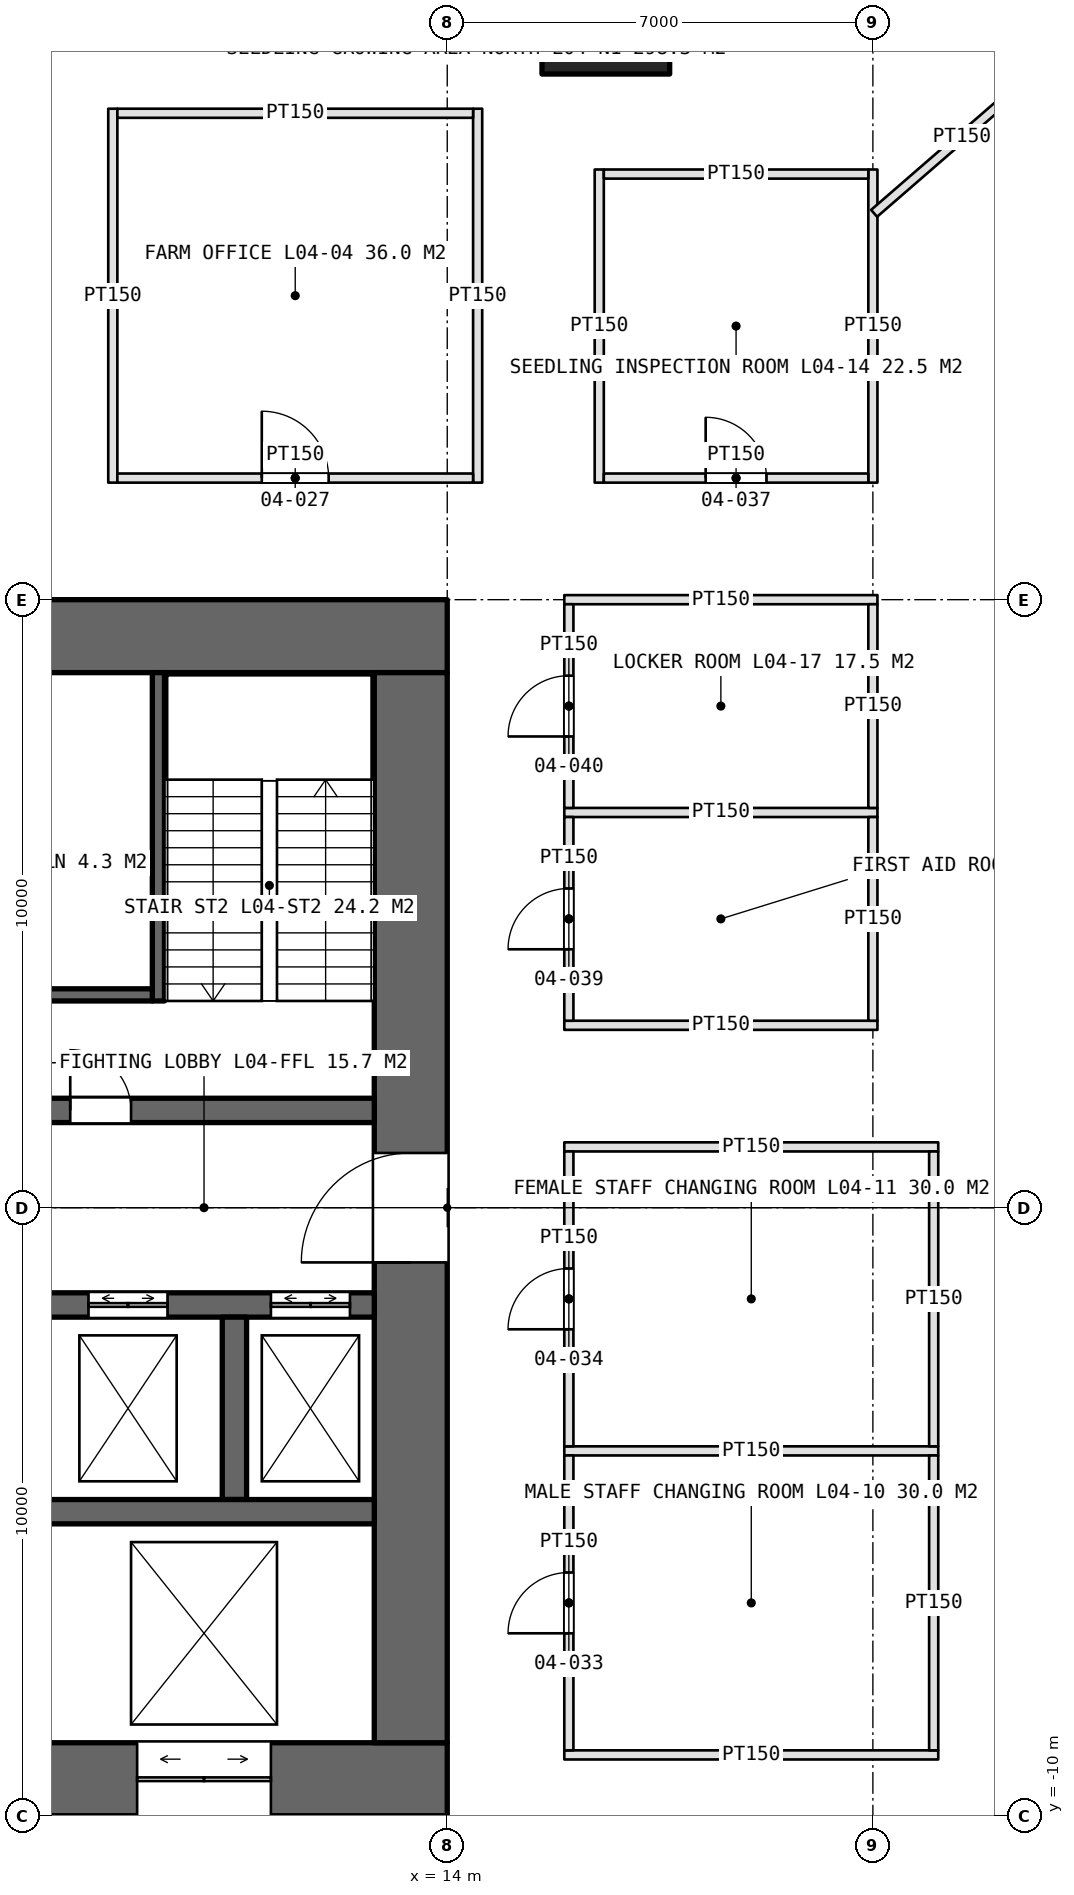
"""IFC4 building model, lengths in metres.
Left out: names, types, materials, properties, quantities, classifications, styles, units other than length and angle.
Written with IfcOpenShell. Run it as: python <this file> out.ifc"""

import sys

from ifc_helpers import new_model, si_unit, direction, frame, frame_2d, origin, origin_2d, place, context, subcontext, project, spatial, rectangle, extrude, element, fill, save


model = new_model("IFC4")
c1 = context("Model", 3, precision=1e-05, world=origin(), true_north=direction((0.0, 1.0)))
c2 = subcontext(c1, "Body", "Model", "MODEL_VIEW")
j1 = project(units=[si_unit("LENGTHUNIT", "METRE"), si_unit("PLANEANGLEUNIT", "RADIAN")], contexts=[c1])
p1 = place(None, origin())
s1 = spatial("IfcSite", under=j1, at=p1, CompositionType="ELEMENT")
p2 = place(p1, origin())
s2 = spatial("IfcBuilding", under=s1, at=p2, CompositionType="ELEMENT")
p3 = place(p2, frame((0.0, 0.0, 20.0)))
s3 = spatial("IfcBuildingStorey", under=s2, at=p3, CompositionType="ELEMENT", Elevation=20.0)
p4 = place(p3, frame((-14.0, -9.4, 0.0), z_axis=(0.0, 0.0, 1.0), x_axis=(1.0, 0.0, 0.0)))
e1 = element("IfcWall", 1, at=p4, inside=s3, PredefinedType="SHEAR", context=c2, shape_type="SweptSolid", body=[
    extrude(rectangle(XDim=28.0, YDim=1.2, at=frame_2d((14.0, 0.0))), origin(), (0.0, 0.0, 1.0), 5.0),
])
p5 = place(p4, frame((13.1, 0.0, 0.0)))
e2 = element("IfcOpeningElement", 2, at=p5, cuts=e1, PredefinedType="OPENING", context=c2, shape_type="SweptSolid", body=[
    extrude(rectangle(XDim=1.8, YDim=2.4, at=frame_2d((0.9, 1.2))), frame((0.0, 0.61, 0.0), z_axis=(0.0, -1.0, 0.0), x_axis=(1.0, 0.0, 0.0)), (0.0, 0.0, 1.0), 1.22),
])
p6 = place(p4, frame((22.9, 0.0, 0.0)))
e3 = element("IfcOpeningElement", 3, at=p6, cuts=e1, PredefinedType="OPENING", context=c2, shape_type="SweptSolid", body=[
    extrude(rectangle(XDim=2.2, YDim=2.7, at=frame_2d((1.1, 1.35))), frame((0.0, 0.61, 0.0), z_axis=(0.0, -1.0, 0.0), x_axis=(1.0, 0.0, 0.0)), (0.0, 0.0, 1.0), 1.22),
])
p7 = place(p3, frame((14.0, 9.4, 0.0), z_axis=(0.0, 0.0, 1.0), x_axis=(-1.0, 0.0, 0.0)))
e4 = element("IfcWall", 4, at=p7, inside=s3, PredefinedType="SHEAR", context=c2, shape_type="SweptSolid", body=[
    extrude(rectangle(XDim=28.0, YDim=1.2, at=frame_2d((14.0, 0.0))), origin(), (0.0, 0.0, 1.0), 5.0),
])
p8 = place(p7, frame((24.0, 0.0, 0.0)))
e5 = element("IfcOpeningElement", 5, at=p8, cuts=e4, PredefinedType="OPENING", context=c2, shape_type="SweptSolid", body=[
    extrude(rectangle(XDim=1.0, YDim=2.4, at=frame_2d((0.5, 1.2))), frame((0.0, 0.61, 0.0), z_axis=(0.0, -1.0, 0.0), x_axis=(1.0, 0.0, 0.0)), (0.0, 0.0, 1.0), 1.22),
])
p9 = place(p7, frame((13.1, 0.0, 0.0)))
e6 = element("IfcOpeningElement", 6, at=p9, cuts=e4, PredefinedType="OPENING", context=c2, shape_type="SweptSolid", body=[
    extrude(rectangle(XDim=1.8, YDim=2.4, at=frame_2d((0.9, 1.2))), frame((0.0, 0.61, 0.0), z_axis=(0.0, -1.0, 0.0), x_axis=(1.0, 0.0, 0.0)), (0.0, 0.0, 1.0), 1.22),
])
p10 = place(p3, frame((13.4, -8.8, 0.0), z_axis=(0.0, 0.0, 1.0), x_axis=(0.0, 1.0, 0.0)))
e7 = element("IfcWall", 7, at=p10, inside=s3, PredefinedType="SHEAR", context=c2, shape_type="SweptSolid", body=[
    extrude(rectangle(XDim=17.6, YDim=1.2, at=frame_2d((8.8, 0.0))), origin(), (0.0, 0.0, 1.0), 5.0),
])
p11 = place(p10, frame((7.9, 0.0, 0.0)))
e8 = element("IfcOpeningElement", 8, at=p11, cuts=e7, PredefinedType="OPENING", context=c2, shape_type="SweptSolid", body=[
    extrude(rectangle(XDim=1.8, YDim=2.4, at=frame_2d((0.9, 1.2))), frame((0.0, 0.61, 0.0), z_axis=(0.0, -1.0, 0.0), x_axis=(1.0, 0.0, 0.0)), (0.0, 0.0, 1.0), 1.22),
])
p12 = place(p3, frame((7.2, 1.6, 0.0), z_axis=(0.0, 0.0, 1.0), x_axis=(1.0, 0.0, 0.0)))
e9 = element("IfcWall", 9, at=p12, inside=s3, PredefinedType="SHEAR", context=c2, shape_type="SweptSolid", body=[
    extrude(rectangle(XDim=5.6, YDim=0.4, at=frame_2d((2.8, 0.0))), origin(), (0.0, 0.0, 1.0), 5.0),
])
p13 = place(p12, frame((0.6, 0.0, 0.0)))
e10 = element("IfcOpeningElement", 10, at=p13, cuts=e9, PredefinedType="OPENING", context=c2, shape_type="SweptSolid", body=[
    extrude(rectangle(XDim=1.0, YDim=2.4, at=frame_2d((0.5, 1.2))), frame((0.0, 0.21, 0.0), z_axis=(0.0, -1.0, 0.0), x_axis=(1.0, 0.0, 0.0)), (0.0, 0.0, 1.0), 0.42),
])
p14 = place(p3, frame((7.2, -1.6, 0.0), z_axis=(0.0, 0.0, 1.0), x_axis=(1.0, 0.0, 0.0)))
e11 = element("IfcWall", 11, at=p14, inside=s3, PredefinedType="SHEAR", context=c2, shape_type="SweptSolid", body=[
    extrude(rectangle(XDim=5.6, YDim=0.4, at=frame_2d((2.8, 0.0))), origin(), (0.0, 0.0, 1.0), 5.0),
])
p15 = place(p14, frame((0.9, 0.0, 0.0)))
e12 = element("IfcOpeningElement", 12, at=p15, cuts=e11, PredefinedType="OPENING", context=c2, shape_type="SweptSolid", body=[
    extrude(rectangle(XDim=1.3, YDim=2.4, at=frame_2d((0.65, 1.2))), frame((0.0, 0.21, 0.0), z_axis=(0.0, -1.0, 0.0), x_axis=(1.0, 0.0, 0.0)), (0.0, 0.0, 1.0), 0.42),
])
p16 = place(p14, frame((3.9, 0.0, 0.0)))
e13 = element("IfcOpeningElement", 13, at=p16, cuts=e11, PredefinedType="OPENING", context=c2, shape_type="SweptSolid", body=[
    extrude(rectangle(XDim=1.3, YDim=2.4, at=frame_2d((0.65, 1.2))), frame((0.0, 0.21, 0.0), z_axis=(0.0, -1.0, 0.0), x_axis=(1.0, 0.0, 0.0)), (0.0, 0.0, 1.0), 0.42),
])
p17 = place(p3, frame((10.5, -4.8, 0.0), z_axis=(0.0, 0.0, 1.0), x_axis=(0.0, 1.0, 0.0)))
e14 = element("IfcWall", 14, at=p17, inside=s3, PredefinedType="SHEAR", context=c2, shape_type="SweptSolid", body=[
    extrude(rectangle(XDim=3.0, YDim=0.4, at=frame_2d((1.5, 0.0))), origin(), (0.0, 0.0, 1.0), 5.0),
])
p18 = place(p3, frame((7.2, -5.0, 0.0), z_axis=(0.0, 0.0, 1.0), x_axis=(1.0, 0.0, 0.0)))
e15 = element("IfcWall", 15, at=p18, inside=s3, PredefinedType="SHEAR", context=c2, shape_type="SweptSolid", body=[
    extrude(rectangle(XDim=5.6, YDim=0.4, at=frame_2d((2.8, 0.0))), origin(), (0.0, 0.0, 1.0), 5.0),
])
p19 = place(p3, frame((16.608, 19.695, 0.0), z_axis=(0.0, 0.0, 1.0), x_axis=(1.0, 0.0, 0.0)))
e16 = element("IfcColumn", 16, at=p19, inside=s3, PredefinedType="COLUMN", context=c2, shape_type="SweptSolid", body=[
    extrude(rectangle(XDim=2.1, YDim=2.1, at=origin_2d()), origin(), (0.0, 0.0, 1.0), 5.0),
])
p20 = place(p3, frame((9.25, 3.4, 0.0), z_axis=(0.0, 0.0, 1.0), x_axis=(0.0, 1.0, 0.0)))
e17 = element("IfcWall", 17, at=p20, inside=s3, PredefinedType="SOLIDWALL", context=c2, shape_type="SweptSolid", body=[
    extrude(rectangle(XDim=5.4, YDim=0.2, at=frame_2d((2.7, 0.0))), origin(), (0.0, 0.0, 1.0), 5.0),
])
p21 = place(p3, frame((9.15, 3.5, 0.0), z_axis=(0.0, 0.0, 1.0), x_axis=(-1.0, 0.0, 0.0)))
e18 = element("IfcWall", 18, at=p21, inside=s3, PredefinedType="SOLIDWALL", context=c2, shape_type="SweptSolid", body=[
    extrude(rectangle(XDim=1.95, YDim=0.2, at=frame_2d((0.975, 0.0))), origin(), (0.0, 0.0, 1.0), 5.0),
])
for number, where, z_axis, x_axis in (
    (19, (8.5, 11.925, 0.0), (0.0, 0.0, 1.0), (0.0, 1.0, 0.0)),
    (20, (14.5, 11.925, 0.0), (0.0, 0.0, 1.0), (0.0, 1.0, 0.0)),
):
    element("IfcWall", number, at=place(p3, frame(where, z_axis=z_axis, x_axis=x_axis)), inside=s3, PredefinedType="PARTITIONING", context=c2, shape_type="SweptSolid", body=[
        extrude(rectangle(XDim=6.15, YDim=0.15, at=frame_2d((3.075, 0.0))), origin(), (0.0, 0.0, 1.0), 3.6),
    ])
p22 = place(p3, frame((8.575, 12.0, 0.0), z_axis=(0.0, 0.0, 1.0), x_axis=(1.0, 0.0, 0.0)))
e21 = element("IfcWall", 21, at=p22, inside=s3, PredefinedType="PARTITIONING", context=c2, shape_type="SweptSolid", body=[
    extrude(rectangle(XDim=5.85, YDim=0.15, at=frame_2d((2.925, 0.0))), origin(), (0.0, 0.0, 1.0), 3.6),
])
p23 = place(p22, frame((2.375, 0.0, 0.0)))
e22 = element("IfcOpeningElement", 22, at=p23, cuts=e21, PredefinedType="OPENING", context=c2, shape_type="SweptSolid", body=[
    extrude(rectangle(XDim=1.1, YDim=2.3, at=frame_2d((0.55, 1.15))), frame((0.0, 0.085, 0.0), z_axis=(0.0, -1.0, 0.0), x_axis=(1.0, 0.0, 0.0)), (0.0, 0.0, 1.0), 0.17),
])
p24 = place(p3, frame((8.575, 18.0, 0.0), z_axis=(0.0, 0.0, 1.0), x_axis=(1.0, 0.0, 0.0)))
e23 = element("IfcWall", 23, at=p24, inside=s3, PredefinedType="PARTITIONING", context=c2, shape_type="SweptSolid", body=[
    extrude(rectangle(XDim=5.85, YDim=0.15, at=frame_2d((2.925, 0.0))), origin(), (0.0, 0.0, 1.0), 3.6),
])
for number, where, z_axis, x_axis in (
    (24, (15.925, -9.0, 0.0), (0.0, 0.0, 1.0), (1.0, 0.0, 0.0)),
    (25, (15.925, -4.0, 0.0), (0.0, 0.0, 1.0), (1.0, 0.0, 0.0)),
    (26, (15.925, 1.0, 0.0), (0.0, 0.0, 1.0), (1.0, 0.0, 0.0)),
):
    element("IfcWall", number, at=place(p3, frame(where, z_axis=z_axis, x_axis=x_axis)), inside=s3, PredefinedType="PARTITIONING", context=c2, shape_type="SweptSolid", body=[
        extrude(rectangle(XDim=6.15, YDim=0.15, at=frame_2d((3.075, 0.0))), origin(), (0.0, 0.0, 1.0), 3.6),
    ])
p25 = place(p3, frame((16.0, -8.925, 0.0), z_axis=(0.0, 0.0, 1.0), x_axis=(0.0, 1.0, 0.0)))
e27 = element("IfcWall", 27, at=p25, inside=s3, PredefinedType="PARTITIONING", context=c2, shape_type="SweptSolid", body=[
    extrude(rectangle(XDim=4.85, YDim=0.15, at=frame_2d((2.425, 0.0))), origin(), (0.0, 0.0, 1.0), 3.6),
])
p26 = place(p25, frame((1.925, 0.0, 0.0)))
e28 = element("IfcOpeningElement", 28, at=p26, cuts=e27, PredefinedType="OPENING", context=c2, shape_type="SweptSolid", body=[
    extrude(rectangle(XDim=1.0, YDim=2.2, at=frame_2d((0.5, 1.1))), frame((0.0, 0.085, 0.0), z_axis=(0.0, -1.0, 0.0), x_axis=(1.0, 0.0, 0.0)), (0.0, 0.0, 1.0), 0.17),
])
p27 = place(p3, frame((22.0, -8.925, 0.0), z_axis=(0.0, 0.0, 1.0), x_axis=(0.0, 1.0, 0.0)))
e29 = element("IfcWall", 29, at=p27, inside=s3, PredefinedType="PARTITIONING", context=c2, shape_type="SweptSolid", body=[
    extrude(rectangle(XDim=4.85, YDim=0.15, at=frame_2d((2.425, 0.0))), origin(), (0.0, 0.0, 1.0), 3.6),
])
p28 = place(p3, frame((16.0, -3.925, 0.0), z_axis=(0.0, 0.0, 1.0), x_axis=(0.0, 1.0, 0.0)))
e30 = element("IfcWall", 30, at=p28, inside=s3, PredefinedType="PARTITIONING", context=c2, shape_type="SweptSolid", body=[
    extrude(rectangle(XDim=4.85, YDim=0.15, at=frame_2d((2.425, 0.0))), origin(), (0.0, 0.0, 1.0), 3.6),
])
p29 = place(p28, frame((1.925, 0.0, 0.0)))
e31 = element("IfcOpeningElement", 31, at=p29, cuts=e30, PredefinedType="OPENING", context=c2, shape_type="SweptSolid", body=[
    extrude(rectangle(XDim=1.0, YDim=2.2, at=frame_2d((0.5, 1.1))), frame((0.0, 0.085, 0.0), z_axis=(0.0, -1.0, 0.0), x_axis=(1.0, 0.0, 0.0)), (0.0, 0.0, 1.0), 0.17),
])
p30 = place(p3, frame((22.0, -3.925, 0.0), z_axis=(0.0, 0.0, 1.0), x_axis=(0.0, 1.0, 0.0)))
e32 = element("IfcWall", 32, at=p30, inside=s3, PredefinedType="PARTITIONING", context=c2, shape_type="SweptSolid", body=[
    extrude(rectangle(XDim=4.85, YDim=0.15, at=frame_2d((2.425, 0.0))), origin(), (0.0, 0.0, 1.0), 3.6),
])
for number, where, z_axis, x_axis in (
    (33, (16.5, 11.925, 0.0), (0.0, 0.0, 1.0), (0.0, 1.0, 0.0)),
    (34, (21.0, 11.925, 0.0), (0.0, 0.0, 1.0), (0.0, 1.0, 0.0)),
):
    element("IfcWall", number, at=place(p3, frame(where, z_axis=z_axis, x_axis=x_axis)), inside=s3, PredefinedType="PARTITIONING", context=c2, shape_type="SweptSolid", body=[
        extrude(rectangle(XDim=5.15, YDim=0.15, at=frame_2d((2.575, 0.0))), origin(), (0.0, 0.0, 1.0), 3.6),
    ])
p31 = place(p3, frame((16.575, 12.0, 0.0), z_axis=(0.0, 0.0, 1.0), x_axis=(1.0, 0.0, 0.0)))
e35 = element("IfcWall", 35, at=p31, inside=s3, PredefinedType="PARTITIONING", context=c2, shape_type="SweptSolid", body=[
    extrude(rectangle(XDim=4.35, YDim=0.15, at=frame_2d((2.175, 0.0))), origin(), (0.0, 0.0, 1.0), 3.6),
])
p32 = place(p31, frame((1.675, 0.0, 0.0)))
e36 = element("IfcOpeningElement", 36, at=p32, cuts=e35, PredefinedType="OPENING", context=c2, shape_type="SweptSolid", body=[
    extrude(rectangle(XDim=1.0, YDim=2.2, at=frame_2d((0.5, 1.1))), frame((0.0, 0.085, 0.0), z_axis=(0.0, -1.0, 0.0), x_axis=(1.0, 0.0, 0.0)), (0.0, 0.0, 1.0), 0.17),
])
p33 = place(p3, frame((16.575, 17.0, 0.0), z_axis=(0.0, 0.0, 1.0), x_axis=(1.0, 0.0, 0.0)))
e37 = element("IfcWall", 37, at=p33, inside=s3, PredefinedType="PARTITIONING", context=c2, shape_type="SweptSolid", body=[
    extrude(rectangle(XDim=4.35, YDim=0.15, at=frame_2d((2.175, 0.0))), origin(), (0.0, 0.0, 1.0), 3.6),
])
for number, where, z_axis, x_axis in (
    (38, (15.925, 3.0, 0.0), (0.0, 0.0, 1.0), (1.0, 0.0, 0.0)),
    (39, (15.925, 6.5, 0.0), (0.0, 0.0, 1.0), (1.0, 0.0, 0.0)),
    (40, (15.925, 10.0, 0.0), (0.0, 0.0, 1.0), (1.0, 0.0, 0.0)),
):
    element("IfcWall", number, at=place(p3, frame(where, z_axis=z_axis, x_axis=x_axis)), inside=s3, PredefinedType="PARTITIONING", context=c2, shape_type="SweptSolid", body=[
        extrude(rectangle(XDim=5.15, YDim=0.15, at=frame_2d((2.575, 0.0))), origin(), (0.0, 0.0, 1.0), 3.6),
    ])
p34 = place(p3, frame((16.0, 3.075, 0.0), z_axis=(0.0, 0.0, 1.0), x_axis=(0.0, 1.0, 0.0)))
e41 = element("IfcWall", 41, at=p34, inside=s3, PredefinedType="PARTITIONING", context=c2, shape_type="SweptSolid", body=[
    extrude(rectangle(XDim=3.35, YDim=0.15, at=frame_2d((1.675, 0.0))), origin(), (0.0, 0.0, 1.0), 3.6),
])
p35 = place(p34, frame((1.175, 0.0, 0.0)))
e42 = element("IfcOpeningElement", 42, at=p35, cuts=e41, PredefinedType="OPENING", context=c2, shape_type="SweptSolid", body=[
    extrude(rectangle(XDim=1.0, YDim=2.2, at=frame_2d((0.5, 1.1))), frame((0.0, 0.085, 0.0), z_axis=(0.0, -1.0, 0.0), x_axis=(1.0, 0.0, 0.0)), (0.0, 0.0, 1.0), 0.17),
])
p36 = place(p3, frame((21.0, 3.075, 0.0), z_axis=(0.0, 0.0, 1.0), x_axis=(0.0, 1.0, 0.0)))
e43 = element("IfcWall", 43, at=p36, inside=s3, PredefinedType="PARTITIONING", context=c2, shape_type="SweptSolid", body=[
    extrude(rectangle(XDim=3.35, YDim=0.15, at=frame_2d((1.675, 0.0))), origin(), (0.0, 0.0, 1.0), 3.6),
])
p37 = place(p3, frame((16.0, 6.575, 0.0), z_axis=(0.0, 0.0, 1.0), x_axis=(0.0, 1.0, 0.0)))
e44 = element("IfcWall", 44, at=p37, inside=s3, PredefinedType="PARTITIONING", context=c2, shape_type="SweptSolid", body=[
    extrude(rectangle(XDim=3.35, YDim=0.15, at=frame_2d((1.675, 0.0))), origin(), (0.0, 0.0, 1.0), 3.6),
])
p38 = place(p37, frame((1.175, 0.0, 0.0)))
e45 = element("IfcOpeningElement", 45, at=p38, cuts=e44, PredefinedType="OPENING", context=c2, shape_type="SweptSolid", body=[
    extrude(rectangle(XDim=1.0, YDim=2.2, at=frame_2d((0.5, 1.1))), frame((0.0, 0.085, 0.0), z_axis=(0.0, -1.0, 0.0), x_axis=(1.0, 0.0, 0.0)), (0.0, 0.0, 1.0), 0.17),
])
p39 = place(p3, frame((21.0, 6.575, 0.0), z_axis=(0.0, 0.0, 1.0), x_axis=(0.0, 1.0, 0.0)))
e46 = element("IfcWall", 46, at=p39, inside=s3, PredefinedType="PARTITIONING", context=c2, shape_type="SweptSolid", body=[
    extrude(rectangle(XDim=3.35, YDim=0.15, at=frame_2d((1.675, 0.0))), origin(), (0.0, 0.0, 1.0), 3.6),
])
p40 = place(p3, frame((21.02, 16.354, 0.0), z_axis=(0.0, 0.0, 1.0), x_axis=(0.755425653008, 0.655234372402, 0.0)))
e47 = element("IfcWall", 47, at=p40, inside=s3, PredefinedType="PARTITIONING", context=c2, shape_type="SweptSolid", body=[
    extrude(rectangle(XDim=3.823, YDim=0.15, at=frame_2d((1.912, 0.0))), origin(), (0.0, 0.0, 1.0), 3.6),
])
p41 = place(p11, origin())
e48 = element("IfcDoor", 48, at=p41, inside=s3, OperationType="DOUBLE_DOOR_SINGLE_SWING", PredefinedType="DOOR", context=c2, shape_type="SweptSolid", body=[
    extrude(rectangle(XDim=1.8, YDim=2.4, at=frame_2d((0.9, 1.2))), frame((0.0, 0.025, 0.0), z_axis=(0.0, -1.0, 0.0), x_axis=(1.0, 0.0, 0.0)), (0.0, 0.0, 1.0), 0.05),
])
fill(e8, e48)
p42 = place(p13, origin())
e49 = element("IfcDoor", 49, at=p42, inside=s3, OperationType="SINGLE_SWING_LEFT", PredefinedType="DOOR", context=c2, shape_type="SweptSolid", body=[
    extrude(rectangle(XDim=1.0, YDim=2.4, at=frame_2d((0.5, 1.2))), frame((0.0, 0.025, 0.0), z_axis=(0.0, -1.0, 0.0), x_axis=(1.0, 0.0, 0.0)), (0.0, 0.0, 1.0), 0.05),
])
fill(e10, e49)
p43 = place(p15, origin())
e50 = element("IfcDoor", 50, at=p43, inside=s3, OperationType="DOUBLE_DOOR_SLIDING", PredefinedType="DOOR", context=c2, shape_type="SweptSolid", body=[
    extrude(rectangle(XDim=1.3, YDim=2.4, at=frame_2d((0.65, 1.2))), frame((0.0, 0.025, 0.0), z_axis=(0.0, -1.0, 0.0), x_axis=(1.0, 0.0, 0.0)), (0.0, 0.0, 1.0), 0.05),
])
fill(e12, e50)
p44 = place(p16, origin())
e51 = element("IfcDoor", 51, at=p44, inside=s3, OperationType="DOUBLE_DOOR_SLIDING", PredefinedType="DOOR", context=c2, shape_type="SweptSolid", body=[
    extrude(rectangle(XDim=1.3, YDim=2.4, at=frame_2d((0.65, 1.2))), frame((0.0, 0.025, 0.0), z_axis=(0.0, -1.0, 0.0), x_axis=(1.0, 0.0, 0.0)), (0.0, 0.0, 1.0), 0.05),
])
fill(e13, e51)
p45 = place(p6, origin())
e52 = element("IfcDoor", 52, at=p45, inside=s3, OperationType="DOUBLE_DOOR_SLIDING", PredefinedType="DOOR", context=c2, shape_type="SweptSolid", body=[
    extrude(rectangle(XDim=2.2, YDim=2.7, at=frame_2d((1.1, 1.35))), frame((0.0, 0.025, 0.0), z_axis=(0.0, -1.0, 0.0), x_axis=(1.0, 0.0, 0.0)), (0.0, 0.0, 1.0), 0.05),
])
fill(e3, e52)
p46 = place(p23, origin())
e53 = element("IfcDoor", 53, at=p46, inside=s3, OperationType="SINGLE_SWING_LEFT", PredefinedType="DOOR", context=c2, shape_type="SweptSolid", body=[
    extrude(rectangle(XDim=1.1, YDim=2.3, at=frame_2d((0.55, 1.15))), frame((0.0, 0.025, 0.0), z_axis=(0.0, -1.0, 0.0), x_axis=(1.0, 0.0, 0.0)), (0.0, 0.0, 1.0), 0.05),
])
fill(e22, e53)
p47 = place(p26, origin())
e54 = element("IfcDoor", 54, at=p47, inside=s3, OperationType="SINGLE_SWING_LEFT", PredefinedType="DOOR", context=c2, shape_type="SweptSolid", body=[
    extrude(rectangle(XDim=1.0, YDim=2.2, at=frame_2d((0.5, 1.1))), frame((0.0, 0.025, 0.0), z_axis=(0.0, -1.0, 0.0), x_axis=(1.0, 0.0, 0.0)), (0.0, 0.0, 1.0), 0.05),
])
fill(e28, e54)
p48 = place(p29, origin())
e55 = element("IfcDoor", 55, at=p48, inside=s3, OperationType="SINGLE_SWING_LEFT", PredefinedType="DOOR", context=c2, shape_type="SweptSolid", body=[
    extrude(rectangle(XDim=1.0, YDim=2.2, at=frame_2d((0.5, 1.1))), frame((0.0, 0.025, 0.0), z_axis=(0.0, -1.0, 0.0), x_axis=(1.0, 0.0, 0.0)), (0.0, 0.0, 1.0), 0.05),
])
fill(e31, e55)
p49 = place(p32, origin())
e56 = element("IfcDoor", 56, at=p49, inside=s3, OperationType="SINGLE_SWING_LEFT", PredefinedType="DOOR", context=c2, shape_type="SweptSolid", body=[
    extrude(rectangle(XDim=1.0, YDim=2.2, at=frame_2d((0.5, 1.1))), frame((0.0, 0.025, 0.0), z_axis=(0.0, -1.0, 0.0), x_axis=(1.0, 0.0, 0.0)), (0.0, 0.0, 1.0), 0.05),
])
fill(e36, e56)
p50 = place(p35, origin())
e57 = element("IfcDoor", 57, at=p50, inside=s3, OperationType="SINGLE_SWING_LEFT", PredefinedType="DOOR", context=c2, shape_type="SweptSolid", body=[
    extrude(rectangle(XDim=1.0, YDim=2.2, at=frame_2d((0.5, 1.1))), frame((0.0, 0.025, 0.0), z_axis=(0.0, -1.0, 0.0), x_axis=(1.0, 0.0, 0.0)), (0.0, 0.0, 1.0), 0.05),
])
fill(e42, e57)
p51 = place(p38, origin())
e58 = element("IfcDoor", 58, at=p51, inside=s3, OperationType="SINGLE_SWING_LEFT", PredefinedType="DOOR", context=c2, shape_type="SweptSolid", body=[
    extrude(rectangle(XDim=1.0, YDim=2.2, at=frame_2d((0.5, 1.1))), frame((0.0, 0.025, 0.0), z_axis=(0.0, -1.0, 0.0), x_axis=(1.0, 0.0, 0.0)), (0.0, 0.0, 1.0), 0.05),
])
fill(e45, e58)
save(model, sys.argv[1])
